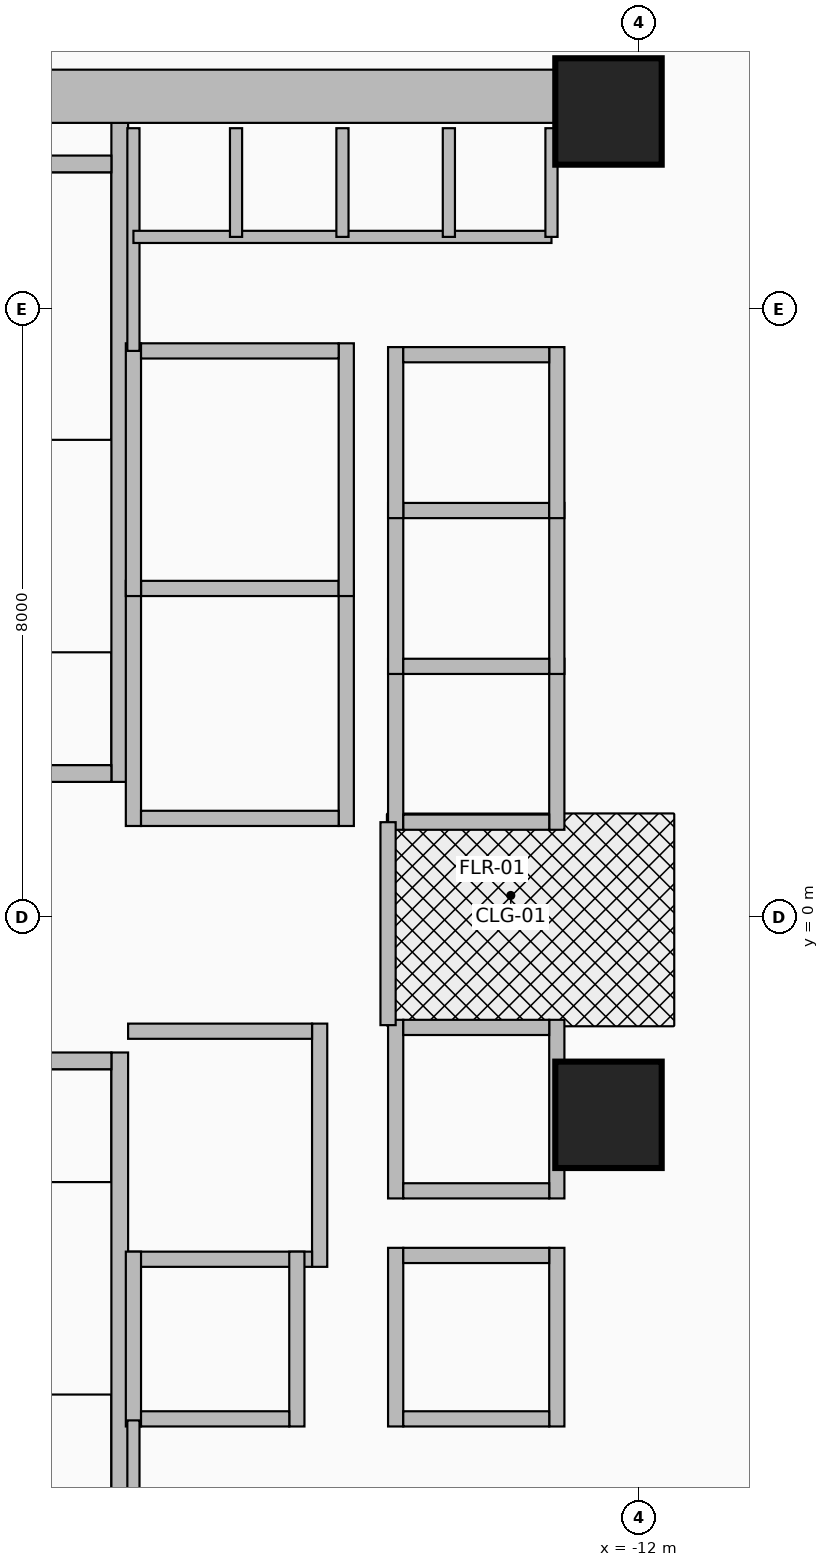
"""IFC4 building model, lengths in metres.
Left out: names, types, materials, properties, quantities, classifications, styles, units other than length and angle.
Written with IfcOpenShell. Run it as: python <this file> out.ifc"""

import sys

from ifc_helpers import new_model, si_unit, direction, frame, frame_2d, origin, origin_2d, place, context, subcontext, project, spatial, rectangle, extrude, source, transform, mapped, element, fill, save


model = new_model("IFC4")
c1 = context("Model", 3, precision=1e-05, world=origin(), true_north=direction((0.0, 1.0)))
c2 = subcontext(c1, "Body", "Model", "MODEL_VIEW")
j1 = project(units=[si_unit("LENGTHUNIT", "METRE"), si_unit("PLANEANGLEUNIT", "RADIAN")], contexts=[c1])
p1 = place(None, origin())
s1 = spatial("IfcSite", under=j1, at=p1, CompositionType="ELEMENT")
p2 = place(p1, origin())
s2 = spatial("IfcBuilding", under=s1, at=p2, CompositionType="ELEMENT")
p3 = place(p2, frame((0.0, 0.0, 48.2)))
s3 = spatial("IfcBuildingStorey", under=s2, at=p3, CompositionType="ELEMENT", Elevation=48.2)
p4 = place(p3, frame((-18.83, 1.78, 0.0), z_axis=(0.0, 0.0, 1.0), x_axis=(0.0, 1.0, 0.0)))
e1 = element("IfcWall", 1, at=p4, inside=s3, PredefinedType="SHEAR", context=c2, shape_type="SweptSolid", body=[
    extrude(rectangle(XDim=8.67, YDim=0.22, at=frame_2d((4.335, 0.0))), origin(), (0.0, 0.0, 1.0), 3.46),
])
p5 = place(p3, frame((-22.05, 1.89, 0.0), z_axis=(0.0, 0.0, 1.0), x_axis=(1.0, 0.0, 0.0)))
e2 = element("IfcWall", 2, at=p5, inside=s3, PredefinedType="SHEAR", context=c2, shape_type="SweptSolid", body=[
    extrude(rectangle(XDim=3.11, YDim=0.22, at=frame_2d((1.555, 0.0))), origin(), (0.0, 0.0, 1.0), 3.46),
])
p6 = place(p5, frame((1.0, 0.0, 0.0)))
e3 = element("IfcOpeningElement", 3, at=p6, cuts=e2, PredefinedType="OPENING", context=c2, shape_type="SweptSolid", body=[
    extrude(rectangle(XDim=1.1, YDim=2.15, at=frame_2d((0.55, 1.075))), frame((0.0, 0.125, 0.0), z_axis=(0.0, -1.0, 0.0), x_axis=(1.0, 0.0, 0.0)), (0.0, 0.0, 1.0), 0.25),
])
p7 = place(p3, frame((-22.05, 9.91, 0.0), z_axis=(0.0, 0.0, 1.0), x_axis=(1.0, 0.0, 0.0)))
e4 = element("IfcWall", 4, at=p7, inside=s3, PredefinedType="SHEAR", context=c2, shape_type="SweptSolid", body=[
    extrude(rectangle(XDim=3.11, YDim=0.22, at=frame_2d((1.555, 0.0))), origin(), (0.0, 0.0, 1.0), 3.46),
])
p8 = place(p3, frame((-18.83, -10.45, 0.0), z_axis=(0.0, 0.0, 1.0), x_axis=(0.0, 1.0, 0.0)))
e5 = element("IfcWall", 5, at=p8, inside=s3, PredefinedType="SHEAR", context=c2, shape_type="SweptSolid", body=[
    extrude(rectangle(XDim=8.67, YDim=0.22, at=frame_2d((4.335, 0.0))), origin(), (0.0, 0.0, 1.0), 3.46),
])
p9 = place(p3, frame((-22.05, -1.89, 0.0), z_axis=(0.0, 0.0, 1.0), x_axis=(1.0, 0.0, 0.0)))
e6 = element("IfcWall", 6, at=p9, inside=s3, PredefinedType="SHEAR", context=c2, shape_type="SweptSolid", body=[
    extrude(rectangle(XDim=3.11, YDim=0.22, at=frame_2d((1.555, 0.0))), origin(), (0.0, 0.0, 1.0), 3.46),
])
p10 = place(p9, frame((1.0, 0.0, 0.0)))
e7 = element("IfcOpeningElement", 7, at=p10, cuts=e6, PredefinedType="OPENING", context=c2, shape_type="SweptSolid", body=[
    extrude(rectangle(XDim=1.1, YDim=2.15, at=frame_2d((0.55, 1.075))), frame((0.0, 0.125, 0.0), z_axis=(0.0, -1.0, 0.0), x_axis=(1.0, 0.0, 0.0)), (0.0, 0.0, 1.0), 0.25),
])
p11 = place(p3, frame((-22.65, 10.8, 0.0), z_axis=(0.0, 0.0, 1.0), x_axis=(1.0, 0.0, 0.0)))
e8 = element("IfcWall", 8, at=p11, inside=s3, PredefinedType="SHEAR", context=c2, shape_type="SweptSolid", body=[
    extrude(rectangle(XDim=10.25, YDim=0.7, at=frame_2d((5.125, 0.0))), origin(), (0.0, 0.0, 1.0), 3.46),
])
m1 = source(origin(), c2, "Body", "SweptSolid", [
    extrude(rectangle(XDim=1.4, YDim=1.4, at=origin_2d()), origin(), (0.0, 0.0, 1.0), 3.7),
])
for number, where, z_axis, x_axis in (
    (9, (-12.4, -2.6, 0.0), (0.0, 0.0, 1.0), (1.0, 0.0, 0.0)),
    (10, (-12.4, 10.6, 0.0), (0.0, 0.0, 1.0), (1.0, 0.0, 0.0)),
):
    element("IfcColumn", number, at=place(p3, frame(where, z_axis=z_axis, x_axis=x_axis)), inside=s3, PredefinedType="COLUMN", context=c2, shape_type="MappedRepresentation", body=[
        mapped(m1, transform((0.0, 0.0, 0.0), x_axis=(1.0, 0.0, 0.0), y_axis=(0.0, 1.0, 0.0), z_axis=(0.0, 0.0, 1.0), scale=1.0)),
    ])
for number, where, z_axis, x_axis in (
    (11, (-18.65, 1.2, 0.0), (0.0, 0.0, 1.0), (0.0, 1.0, 0.0)),
    (12, (-15.85, 1.2, 0.0), (0.0, 0.0, 1.0), (0.0, 1.0, 0.0)),
):
    element("IfcWall", number, at=place(p3, frame(where, z_axis=z_axis, x_axis=x_axis)), inside=s3, PredefinedType="MOVABLE", context=c2, shape_type="SweptSolid", body=[
        extrude(rectangle(XDim=3.225, YDim=0.2, at=frame_2d((1.613, 0.0))), origin(), (0.0, 0.0, 1.0), 3.46),
    ])
p12 = place(p3, frame((-18.55, 1.3, 0.0), z_axis=(0.0, 0.0, 1.0), x_axis=(1.0, 0.0, 0.0)))
e13 = element("IfcWall", 13, at=p12, inside=s3, PredefinedType="MOVABLE", context=c2, shape_type="SweptSolid", body=[
    extrude(rectangle(XDim=2.6, YDim=0.2, at=frame_2d((1.3, 0.0))), origin(), (0.0, 0.0, 1.0), 3.46),
])
p13 = place(p12, frame((0.7, 0.0, 0.0)))
e14 = element("IfcOpeningElement", 14, at=p13, cuts=e13, PredefinedType="OPENING", context=c2, shape_type="SweptSolid", body=[
    extrude(rectangle(XDim=1.2, YDim=2.1, at=frame_2d((0.6, 1.05))), frame((0.0, 0.115, 0.0), z_axis=(0.0, -1.0, 0.0), x_axis=(1.0, 0.0, 0.0)), (0.0, 0.0, 1.0), 0.23),
])
p14 = place(p3, frame((-18.55, 4.325, 0.0), z_axis=(0.0, 0.0, 1.0), x_axis=(1.0, 0.0, 0.0)))
e15 = element("IfcWall", 15, at=p14, inside=s3, PredefinedType="MOVABLE", context=c2, shape_type="SweptSolid", body=[
    extrude(rectangle(XDim=2.6, YDim=0.2, at=frame_2d((1.3, 0.0))), origin(), (0.0, 0.0, 1.0), 3.46),
])
p15 = place(p3, frame((-16.2, -4.6, 0.0), z_axis=(0.0, 0.0, 1.0), x_axis=(0.0, 1.0, 0.0)))
e16 = element("IfcWall", 16, at=p15, inside=s3, PredefinedType="MOVABLE", context=c2, shape_type="SweptSolid", body=[
    extrude(rectangle(XDim=3.2, YDim=0.2, at=frame_2d((1.6, 0.0))), origin(), (0.0, 0.0, 1.0), 3.46),
])
p16 = place(p3, frame((-18.72, -4.5, 0.0), z_axis=(0.0, 0.0, 1.0), x_axis=(1.0, 0.0, 0.0)))
e17 = element("IfcWall", 17, at=p16, inside=s3, PredefinedType="MOVABLE", context=c2, shape_type="SweptSolid", body=[
    extrude(rectangle(XDim=2.42, YDim=0.2, at=frame_2d((1.21, 0.0))), origin(), (0.0, 0.0, 1.0), 3.46),
])
p17 = place(p3, frame((-18.72, -1.5, 0.0), z_axis=(0.0, 0.0, 1.0), x_axis=(1.0, 0.0, 0.0)))
e18 = element("IfcWall", 18, at=p17, inside=s3, PredefinedType="MOVABLE", context=c2, shape_type="SweptSolid", body=[
    extrude(rectangle(XDim=2.42, YDim=0.2, at=frame_2d((1.21, 0.0))), origin(), (0.0, 0.0, 1.0), 3.46),
])
p18 = place(p17, frame((0.61, 0.0, 0.0)))
e19 = element("IfcOpeningElement", 19, at=p18, cuts=e18, PredefinedType="OPENING", context=c2, shape_type="SweptSolid", body=[
    extrude(rectangle(XDim=1.2, YDim=2.1, at=frame_2d((0.6, 1.05))), frame((0.0, 0.115, 0.0), z_axis=(0.0, -1.0, 0.0), x_axis=(1.0, 0.0, 0.0)), (0.0, 0.0, 1.0), 0.23),
])
for number, where, z_axis, x_axis in (
    (20, (-18.65, 4.225, 0.0), (0.0, 0.0, 1.0), (0.0, 1.0, 0.0)),
    (21, (-15.85, 4.225, 0.0), (0.0, 0.0, 1.0), (0.0, 1.0, 0.0)),
):
    element("IfcWall", number, at=place(p3, frame(where, z_axis=z_axis, x_axis=x_axis)), inside=s3, PredefinedType="MOVABLE", context=c2, shape_type="SweptSolid", body=[
        extrude(rectangle(XDim=3.325, YDim=0.2, at=frame_2d((1.663, 0.0))), origin(), (0.0, 0.0, 1.0), 3.46),
    ])
p19 = place(p3, frame((-18.55, 7.45, 0.0), z_axis=(0.0, 0.0, 1.0), x_axis=(1.0, 0.0, 0.0)))
e22 = element("IfcWall", 22, at=p19, inside=s3, PredefinedType="MOVABLE", context=c2, shape_type="SweptSolid", body=[
    extrude(rectangle(XDim=2.6, YDim=0.2, at=frame_2d((1.3, 0.0))), origin(), (0.0, 0.0, 1.0), 3.46),
])
p20 = place(p19, frame((0.7, 0.0, 0.0)))
e23 = element("IfcOpeningElement", 23, at=p20, cuts=e22, PredefinedType="OPENING", context=c2, shape_type="SweptSolid", body=[
    extrude(rectangle(XDim=1.2, YDim=2.1, at=frame_2d((0.6, 1.05))), frame((0.0, 0.115, 0.0), z_axis=(0.0, -1.0, 0.0), x_axis=(1.0, 0.0, 0.0)), (0.0, 0.0, 1.0), 0.23),
])
for number, where, z_axis, x_axis in (
    (24, (-15.2, -6.7, 0.0), (0.0, 0.0, 1.0), (0.0, 1.0, 0.0)),
    (25, (-13.08, -6.7, 0.0), (0.0, 0.0, 1.0), (0.0, 1.0, 0.0)),
):
    element("IfcWall", number, at=place(p3, frame(where, z_axis=z_axis, x_axis=x_axis)), inside=s3, PredefinedType="MOVABLE", context=c2, shape_type="SweptSolid", body=[
        extrude(rectangle(XDim=2.35, YDim=0.2, at=frame_2d((1.175, 0.0))), origin(), (0.0, 0.0, 1.0), 3.46),
    ])
p21 = place(p3, frame((-15.1, -6.6, 0.0), z_axis=(0.0, 0.0, 1.0), x_axis=(1.0, 0.0, 0.0)))
e26 = element("IfcWall", 26, at=p21, inside=s3, PredefinedType="MOVABLE", context=c2, shape_type="SweptSolid", body=[
    extrude(rectangle(XDim=1.92, YDim=0.2, at=frame_2d((0.96, 0.0))), origin(), (0.0, 0.0, 1.0), 3.46),
])
p22 = place(p21, frame((0.41, 0.0, 0.0)))
e27 = element("IfcOpeningElement", 27, at=p22, cuts=e26, PredefinedType="OPENING", context=c2, shape_type="SweptSolid", body=[
    extrude(rectangle(XDim=1.1, YDim=2.1, at=frame_2d((0.55, 1.05))), frame((0.0, 0.115, 0.0), z_axis=(0.0, -1.0, 0.0), x_axis=(1.0, 0.0, 0.0)), (0.0, 0.0, 1.0), 0.23),
])
p23 = place(p3, frame((-15.1, -4.45, 0.0), z_axis=(0.0, 0.0, 1.0), x_axis=(1.0, 0.0, 0.0)))
e28 = element("IfcWall", 28, at=p23, inside=s3, PredefinedType="MOVABLE", context=c2, shape_type="SweptSolid", body=[
    extrude(rectangle(XDim=1.92, YDim=0.2, at=frame_2d((0.96, 0.0))), origin(), (0.0, 0.0, 1.0), 3.46),
])
for number, where, z_axis, x_axis in (
    (29, (-15.2, 1.15, 0.0), (0.0, 0.0, 1.0), (0.0, 1.0, 0.0)),
    (30, (-13.08, 1.15, 0.0), (0.0, 0.0, 1.0), (0.0, 1.0, 0.0)),
):
    element("IfcWall", number, at=place(p3, frame(where, z_axis=z_axis, x_axis=x_axis)), inside=s3, PredefinedType="MOVABLE", context=c2, shape_type="SweptSolid", body=[
        extrude(rectangle(XDim=2.25, YDim=0.2, at=frame_2d((1.125, 0.0))), origin(), (0.0, 0.0, 1.0), 3.46),
    ])
p24 = place(p3, frame((-15.1, 1.25, 0.0), z_axis=(0.0, 0.0, 1.0), x_axis=(1.0, 0.0, 0.0)))
e31 = element("IfcWall", 31, at=p24, inside=s3, PredefinedType="MOVABLE", context=c2, shape_type="SweptSolid", body=[
    extrude(rectangle(XDim=1.92, YDim=0.2, at=frame_2d((0.96, 0.0))), origin(), (0.0, 0.0, 1.0), 3.46),
])
for number, where, z_axis, x_axis in (
    (32, (-15.2, 3.2, 0.0), (0.0, 0.0, 1.0), (0.0, 1.0, 0.0)),
    (33, (-13.08, 3.2, 0.0), (0.0, 0.0, 1.0), (0.0, 1.0, 0.0)),
):
    element("IfcWall", number, at=place(p3, frame(where, z_axis=z_axis, x_axis=x_axis)), inside=s3, PredefinedType="MOVABLE", context=c2, shape_type="SweptSolid", body=[
        extrude(rectangle(XDim=2.25, YDim=0.2, at=frame_2d((1.125, 0.0))), origin(), (0.0, 0.0, 1.0), 3.46),
    ])
for number, where, z_axis, x_axis in (
    (34, (-15.1, 3.3, 0.0), (0.0, 0.0, 1.0), (1.0, 0.0, 0.0)),
    (35, (-15.1, 5.35, 0.0), (0.0, 0.0, 1.0), (1.0, 0.0, 0.0)),
):
    element("IfcWall", number, at=place(p3, frame(where, z_axis=z_axis, x_axis=x_axis)), inside=s3, PredefinedType="MOVABLE", context=c2, shape_type="SweptSolid", body=[
        extrude(rectangle(XDim=1.92, YDim=0.2, at=frame_2d((0.96, 0.0))), origin(), (0.0, 0.0, 1.0), 3.46),
    ])
for number, where, z_axis, x_axis in (
    (36, (-15.2, 5.25, 0.0), (0.0, 0.0, 1.0), (0.0, 1.0, 0.0)),
    (37, (-13.08, 5.25, 0.0), (0.0, 0.0, 1.0), (0.0, 1.0, 0.0)),
):
    element("IfcWall", number, at=place(p3, frame(where, z_axis=z_axis, x_axis=x_axis)), inside=s3, PredefinedType="MOVABLE", context=c2, shape_type="SweptSolid", body=[
        extrude(rectangle(XDim=2.25, YDim=0.2, at=frame_2d((1.125, 0.0))), origin(), (0.0, 0.0, 1.0), 3.46),
    ])
p25 = place(p3, frame((-15.1, 7.4, 0.0), z_axis=(0.0, 0.0, 1.0), x_axis=(1.0, 0.0, 0.0)))
e38 = element("IfcWall", 38, at=p25, inside=s3, PredefinedType="MOVABLE", context=c2, shape_type="SweptSolid", body=[
    extrude(rectangle(XDim=1.92, YDim=0.2, at=frame_2d((0.96, 0.0))), origin(), (0.0, 0.0, 1.0), 3.46),
])
for number, where, z_axis, x_axis in (
    (39, (-18.65, -6.7, 0.0), (0.0, 0.0, 1.0), (0.0, 1.0, 0.0)),
    (40, (-16.5, -6.7, 0.0), (0.0, 0.0, 1.0), (0.0, 1.0, 0.0)),
):
    element("IfcWall", number, at=place(p3, frame(where, z_axis=z_axis, x_axis=x_axis)), inside=s3, PredefinedType="MOVABLE", context=c2, shape_type="SweptSolid", body=[
        extrude(rectangle(XDim=2.3, YDim=0.2, at=frame_2d((1.15, 0.0))), origin(), (0.0, 0.0, 1.0), 3.46),
    ])
p26 = place(p3, frame((-18.55, -6.6, 0.0), z_axis=(0.0, 0.0, 1.0), x_axis=(1.0, 0.0, 0.0)))
e41 = element("IfcWall", 41, at=p26, inside=s3, PredefinedType="MOVABLE", context=c2, shape_type="SweptSolid", body=[
    extrude(rectangle(XDim=1.95, YDim=0.2, at=frame_2d((0.975, 0.0))), origin(), (0.0, 0.0, 1.0), 3.46),
])
for number, where, z_axis, x_axis in (
    (42, (-15.2, -3.7, 0.0), (0.0, 0.0, 1.0), (0.0, 1.0, 0.0)),
    (43, (-13.08, -3.7, 0.0), (0.0, 0.0, 1.0), (0.0, 1.0, 0.0)),
):
    element("IfcWall", number, at=place(p3, frame(where, z_axis=z_axis, x_axis=x_axis)), inside=s3, PredefinedType="MOVABLE", context=c2, shape_type="SweptSolid", body=[
        extrude(rectangle(XDim=2.35, YDim=0.2, at=frame_2d((1.175, 0.0))), origin(), (0.0, 0.0, 1.0), 3.46),
    ])
for number, where, z_axis, x_axis in (
    (44, (-15.1, -3.6, 0.0), (0.0, 0.0, 1.0), (1.0, 0.0, 0.0)),
    (45, (-15.1, -1.45, 0.0), (0.0, 0.0, 1.0), (1.0, 0.0, 0.0)),
):
    element("IfcWall", number, at=place(p3, frame(where, z_axis=z_axis, x_axis=x_axis)), inside=s3, PredefinedType="MOVABLE", context=c2, shape_type="SweptSolid", body=[
        extrude(rectangle(XDim=1.92, YDim=0.2, at=frame_2d((0.96, 0.0))), origin(), (0.0, 0.0, 1.0), 3.46),
    ])
p27 = place(p3, frame((-15.3, -1.42, 0.0), z_axis=(0.0, 0.0, 1.0), x_axis=(0.0, 1.0, 0.0)))
e46 = element("IfcWall", 46, at=p27, inside=s3, PredefinedType="PARTITIONING", context=c2, shape_type="SweptSolid", body=[
    extrude(rectangle(XDim=2.67, YDim=0.2, at=frame_2d((1.335, 0.0))), origin(), (0.0, 0.0, 1.0), 3.46),
])
p28 = place(p27, frame((0.78, 0.0, 0.0)))
e47 = element("IfcOpeningElement", 47, at=p28, cuts=e46, PredefinedType="OPENING", context=c2, shape_type="SweptSolid", body=[
    extrude(rectangle(XDim=1.05, YDim=2.15, at=frame_2d((0.525, 1.075))), frame((0.0, 0.115, 0.0), z_axis=(0.0, -1.0, 0.0), x_axis=(1.0, 0.0, 0.0)), (0.0, 0.0, 1.0), 0.23),
])
p29 = place(p3, frame((-18.65, 7.45, 0.0), z_axis=(0.0, 0.0, 1.0), x_axis=(0.0, 1.0, 0.0)))
e48 = element("IfcWall", 48, at=p29, inside=s3, PredefinedType="PARTITIONING", context=c2, shape_type="SweptSolid", body=[
    extrude(rectangle(XDim=2.93, YDim=0.16, at=frame_2d((1.465, 0.0))), origin(), (0.0, 0.0, 1.0), 3.46),
])
p30 = place(p3, frame((-18.65, -8.18, 0.0), z_axis=(0.0, 0.0, 1.0), x_axis=(0.0, 1.0, 0.0)))
e49 = element("IfcWall", 49, at=p30, inside=s3, PredefinedType="PARTITIONING", context=c2, shape_type="SweptSolid", body=[
    extrude(rectangle(XDim=1.56, YDim=0.16, at=frame_2d((0.78, 0.0))), origin(), (0.0, 0.0, 1.0), 3.46),
])
p31 = place(p3, frame((-18.65, 8.95, 0.0), z_axis=(0.0, 0.0, 1.0), x_axis=(1.0, 0.0, 0.0)))
e50 = element("IfcWall", 50, at=p31, inside=s3, PredefinedType="PARTITIONING", context=c2, shape_type="SweptSolid", body=[
    extrude(rectangle(XDim=5.5, YDim=0.16, at=frame_2d((2.75, 0.0))), origin(), (0.0, 0.0, 1.0), 3.46),
])
p32 = place(p31, frame((0.3, 0.0, 0.0)))
e51 = element("IfcOpeningElement", 51, at=p32, cuts=e50, PredefinedType="OPENING", context=c2, shape_type="SweptSolid", body=[
    extrude(rectangle(XDim=0.85, YDim=2.05, at=frame_2d((0.425, 1.025))), frame((0.0, 0.095, 0.0), z_axis=(0.0, -1.0, 0.0), x_axis=(1.0, 0.0, 0.0)), (0.0, 0.0, 1.0), 0.19),
])
p33 = place(p31, frame((1.55, 0.0, 0.0)))
e52 = element("IfcOpeningElement", 52, at=p33, cuts=e50, PredefinedType="OPENING", context=c2, shape_type="SweptSolid", body=[
    extrude(rectangle(XDim=0.85, YDim=2.05, at=frame_2d((0.425, 1.025))), frame((0.0, 0.095, 0.0), z_axis=(0.0, -1.0, 0.0), x_axis=(1.0, 0.0, 0.0)), (0.0, 0.0, 1.0), 0.19),
])
p34 = place(p31, frame((2.95, 0.0, 0.0)))
e53 = element("IfcOpeningElement", 53, at=p34, cuts=e50, PredefinedType="OPENING", context=c2, shape_type="SweptSolid", body=[
    extrude(rectangle(XDim=0.85, YDim=2.05, at=frame_2d((0.425, 1.025))), frame((0.0, 0.095, 0.0), z_axis=(0.0, -1.0, 0.0), x_axis=(1.0, 0.0, 0.0)), (0.0, 0.0, 1.0), 0.19),
])
p35 = place(p31, frame((4.35, 0.0, 0.0)))
e54 = element("IfcOpeningElement", 54, at=p35, cuts=e50, PredefinedType="OPENING", context=c2, shape_type="SweptSolid", body=[
    extrude(rectangle(XDim=0.85, YDim=2.05, at=frame_2d((0.425, 1.025))), frame((0.0, 0.095, 0.0), z_axis=(0.0, -1.0, 0.0), x_axis=(1.0, 0.0, 0.0)), (0.0, 0.0, 1.0), 0.19),
])
for number, where, z_axis, x_axis in (
    (55, (-13.15, 8.95, 0.0), (0.0, 0.0, 1.0), (0.0, 1.0, 0.0)),
    (56, (-17.3, 8.95, 0.0), (0.0, 0.0, 1.0), (0.0, 1.0, 0.0)),
    (57, (-15.9, 8.95, 0.0), (0.0, 0.0, 1.0), (0.0, 1.0, 0.0)),
    (58, (-14.5, 8.95, 0.0), (0.0, 0.0, 1.0), (0.0, 1.0, 0.0)),
):
    element("IfcWall", number, at=place(p3, frame(where, z_axis=z_axis, x_axis=x_axis)), inside=s3, PredefinedType="PARTITIONING", context=c2, shape_type="SweptSolid", body=[
        extrude(rectangle(XDim=1.43, YDim=0.16, at=frame_2d((0.715, 0.0))), origin(), (0.0, 0.0, 1.0), 3.46),
    ])
p36 = place(p13, origin())
e59 = element("IfcDoor", 59, at=p36, inside=s3, OperationType="DOUBLE_DOOR_SLIDING", PredefinedType="DOOR", context=c2, shape_type="SweptSolid", body=[
    extrude(rectangle(XDim=1.2, YDim=2.1, at=frame_2d((0.6, 1.05))), frame((0.0, 0.025, 0.0), z_axis=(0.0, -1.0, 0.0), x_axis=(1.0, 0.0, 0.0)), (0.0, 0.0, 1.0), 0.05),
])
fill(e14, e59)
p37 = place(p18, origin())
e60 = element("IfcDoor", 60, at=p37, inside=s3, OperationType="DOUBLE_DOOR_SLIDING", PredefinedType="DOOR", context=c2, shape_type="SweptSolid", body=[
    extrude(rectangle(XDim=1.2, YDim=2.1, at=frame_2d((0.6, 1.05))), frame((0.0, 0.025, 0.0), z_axis=(0.0, -1.0, 0.0), x_axis=(1.0, 0.0, 0.0)), (0.0, 0.0, 1.0), 0.05),
])
fill(e19, e60)
p38 = place(p20, origin())
e61 = element("IfcDoor", 61, at=p38, inside=s3, OperationType="DOUBLE_DOOR_SLIDING", PredefinedType="DOOR", context=c2, shape_type="SweptSolid", body=[
    extrude(rectangle(XDim=1.2, YDim=2.1, at=frame_2d((0.6, 1.05))), frame((0.0, 0.025, 0.0), z_axis=(0.0, -1.0, 0.0), x_axis=(1.0, 0.0, 0.0)), (0.0, 0.0, 1.0), 0.05),
])
fill(e23, e61)
p39 = place(p22, origin())
e62 = element("IfcDoor", 62, at=p39, inside=s3, OperationType="DOUBLE_DOOR_SLIDING", PredefinedType="DOOR", context=c2, shape_type="SweptSolid", body=[
    extrude(rectangle(XDim=1.1, YDim=2.1, at=frame_2d((0.55, 1.05))), frame((0.0, 0.025, 0.0), z_axis=(0.0, -1.0, 0.0), x_axis=(1.0, 0.0, 0.0)), (0.0, 0.0, 1.0), 0.05),
])
fill(e27, e62)
p40 = place(p28, origin())
e63 = element("IfcDoor", 63, at=p40, inside=s3, OperationType="SINGLE_SWING_RIGHT", PredefinedType="DOOR", context=c2, shape_type="SweptSolid", body=[
    extrude(rectangle(XDim=1.05, YDim=2.15, at=frame_2d((0.525, 1.075))), frame((0.0, 0.025, 0.0), z_axis=(0.0, -1.0, 0.0), x_axis=(1.0, 0.0, 0.0)), (0.0, 0.0, 1.0), 0.05),
])
fill(e47, e63)
p41 = place(p32, origin())
e64 = element("IfcDoor", 64, at=p41, inside=s3, OperationType="SINGLE_SWING_LEFT", PredefinedType="DOOR", context=c2, shape_type="SweptSolid", body=[
    extrude(rectangle(XDim=0.85, YDim=2.05, at=frame_2d((0.425, 1.025))), frame((0.0, 0.025, 0.0), z_axis=(0.0, -1.0, 0.0), x_axis=(1.0, 0.0, 0.0)), (0.0, 0.0, 1.0), 0.05),
])
fill(e51, e64)
p42 = place(p33, origin())
e65 = element("IfcDoor", 65, at=p42, inside=s3, OperationType="SINGLE_SWING_RIGHT", PredefinedType="DOOR", context=c2, shape_type="SweptSolid", body=[
    extrude(rectangle(XDim=0.85, YDim=2.05, at=frame_2d((0.425, 1.025))), frame((0.0, 0.025, 0.0), z_axis=(0.0, -1.0, 0.0), x_axis=(1.0, 0.0, 0.0)), (0.0, 0.0, 1.0), 0.05),
])
fill(e52, e65)
p43 = place(p34, origin())
e66 = element("IfcDoor", 66, at=p43, inside=s3, OperationType="SINGLE_SWING_LEFT", PredefinedType="DOOR", context=c2, shape_type="SweptSolid", body=[
    extrude(rectangle(XDim=0.85, YDim=2.05, at=frame_2d((0.425, 1.025))), frame((0.0, 0.025, 0.0), z_axis=(0.0, -1.0, 0.0), x_axis=(1.0, 0.0, 0.0)), (0.0, 0.0, 1.0), 0.05),
])
fill(e53, e66)
p44 = place(p35, origin())
e67 = element("IfcDoor", 67, at=p44, inside=s3, OperationType="SINGLE_SWING_RIGHT", PredefinedType="DOOR", context=c2, shape_type="SweptSolid", body=[
    extrude(rectangle(XDim=0.85, YDim=2.05, at=frame_2d((0.425, 1.025))), frame((0.0, 0.025, 0.0), z_axis=(0.0, -1.0, 0.0), x_axis=(1.0, 0.0, 0.0)), (0.0, 0.0, 1.0), 0.05),
])
fill(e54, e67)
save(model, sys.argv[1])
